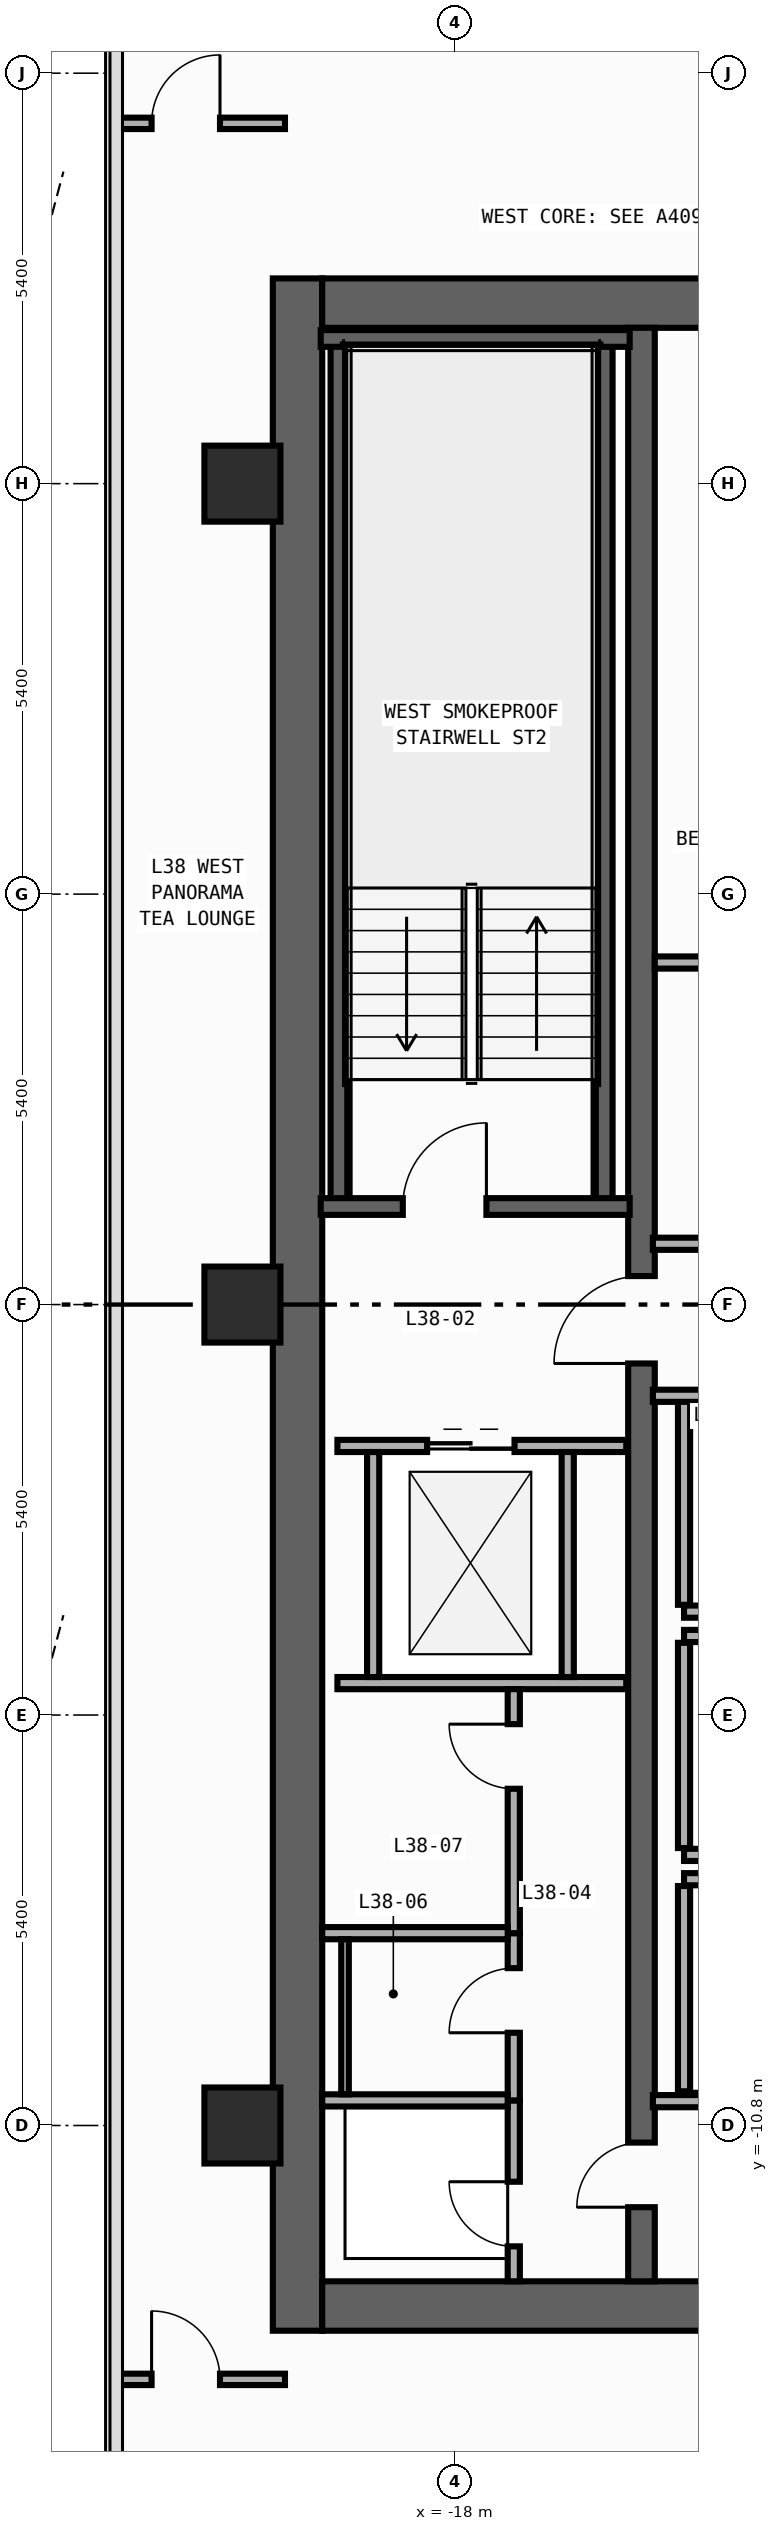
"""IFC4 building model, lengths in metres.
Left out: names, types, materials, properties, quantities, classifications, styles, units other than length and angle.
Written with IfcOpenShell. Run it as: python <this file> out.ifc"""

import sys

from ifc_helpers import new_model, si_unit, direction, frame, frame_2d, origin, origin_2d, place, context, subcontext, project, spatial, rectangle, extrude, element, fill, save


model = new_model("IFC4")
c1 = context("Model", 3, precision=1e-05, world=origin(), true_north=direction((0.0, 1.0)))
c2 = subcontext(c1, "Body", "Model", "MODEL_VIEW")
j1 = project(units=[si_unit("LENGTHUNIT", "METRE"), si_unit("PLANEANGLEUNIT", "RADIAN")], contexts=[c1])
p1 = place(None, origin())
s1 = spatial("IfcSite", under=j1, at=p1, CompositionType="ELEMENT")
p2 = place(p1, origin())
s2 = spatial("IfcBuilding", under=s1, at=p2, CompositionType="ELEMENT")
p3 = place(p2, frame((0.0, 0.0, 168.8)))
s3 = spatial("IfcBuildingStorey", under=s2, at=p3, CompositionType="ELEMENT", Elevation=168.8)
p4 = place(p3, frame((-20.075, -13.5, 0.0), z_axis=(0.0, 0.0, 1.0), x_axis=(0.0, 1.0, 0.0)))
e1 = element("IfcWall", 1, at=p4, inside=s3, PredefinedType="SHEAR", context=c2, shape_type="SweptSolid", body=[
    extrude(rectangle(XDim=27.0, YDim=0.65, at=frame_2d((13.5, 0.0))), origin(), (0.0, 0.0, 1.0), 3.54),
])
for number, where, z_axis, x_axis in (
    (2, (-19.75, -13.175, 0.0), (0.0, 0.0, 1.0), (1.0, 0.0, 0.0)),
    (3, (-19.75, 13.175, 0.0), (0.0, 0.0, 1.0), (1.0, 0.0, 0.0)),
):
    element("IfcWall", number, at=place(p3, frame(where, z_axis=z_axis, x_axis=x_axis)), inside=s3, PredefinedType="SHEAR", context=c2, shape_type="SweptSolid", body=[
        extrude(rectangle(XDim=7.1, YDim=0.65, at=frame_2d((3.55, 0.0))), origin(), (0.0, 0.0, 1.0), 3.54),
    ])
p5 = place(p3, frame((-15.55, -12.85, 0.0), z_axis=(0.0, 0.0, 1.0), x_axis=(0.0, 1.0, 0.0)))
e4 = element("IfcWall", 4, at=p5, inside=s3, PredefinedType="SHEAR", context=c2, shape_type="SweptSolid", body=[
    extrude(rectangle(XDim=25.7, YDim=0.35, at=frame_2d((12.85, 0.0))), origin(), (0.0, 0.0, 1.0), 3.54),
])
p6 = place(p5, frame((12.075, 0.0, 0.0)))
e5 = element("IfcOpeningElement", 5, at=p6, cuts=e4, PredefinedType="OPENING", context=c2, shape_type="SweptSolid", body=[
    extrude(rectangle(XDim=1.15, YDim=2.2, at=frame_2d((0.575, 1.1))), frame((0.0, 0.185, 0.0), z_axis=(0.0, -1.0, 0.0), x_axis=(1.0, 0.0, 0.0)), (0.0, 0.0, 1.0), 0.37),
])
p7 = place(p5, frame((0.975, 0.0, 0.0)))
e6 = element("IfcOpeningElement", 6, at=p7, cuts=e4, PredefinedType="OPENING", context=c2, shape_type="SweptSolid", body=[
    extrude(rectangle(XDim=0.85, YDim=2.1, at=frame_2d((0.425, 1.05))), frame((0.0, 0.185, 0.0), z_axis=(0.0, -1.0, 0.0), x_axis=(1.0, 0.0, 0.0)), (0.0, 0.0, 1.0), 0.37),
])
for number, where, z_axis, x_axis in (
    (7, (-16.04, 1.29, 0.0), (0.0, 0.0, 1.0), (0.0, 1.0, 0.0)),
    (8, (-19.53, 1.29, 0.0), (0.0, 0.0, 1.0), (0.0, 1.0, 0.0)),
):
    element("IfcWall", number, at=place(p3, frame(where, z_axis=z_axis, x_axis=x_axis)), inside=s3, PredefinedType="SHEAR", context=c2, shape_type="SweptSolid", body=[
        extrude(rectangle(XDim=11.42, YDim=0.22, at=frame_2d((5.71, 0.0))), origin(), (0.0, 0.0, 1.0), 3.54),
    ])
p8 = place(p3, frame((-19.77, 12.71, 0.0), z_axis=(0.0, 0.0, 1.0), x_axis=(1.0, 0.0, 0.0)))
e9 = element("IfcWall", 9, at=p8, inside=s3, PredefinedType="SHEAR", context=c2, shape_type="SweptSolid", body=[
    extrude(rectangle(XDim=4.065, YDim=0.22, at=frame_2d((2.032, 0.0))), origin(), (0.0, 0.0, 1.0), 3.54),
])
p9 = place(p3, frame((-19.77, 1.29, 0.0), z_axis=(0.0, 0.0, 1.0), x_axis=(1.0, 0.0, 0.0)))
e10 = element("IfcWall", 10, at=p9, inside=s3, PredefinedType="SHEAR", context=c2, shape_type="SweptSolid", body=[
    extrude(rectangle(XDim=4.065, YDim=0.22, at=frame_2d((2.032, 0.0))), origin(), (0.0, 0.0, 1.0), 3.54),
])
p10 = place(p9, frame((1.08, 0.0, 0.0)))
e11 = element("IfcOpeningElement", 11, at=p10, cuts=e10, PredefinedType="OPENING", context=c2, shape_type="SweptSolid", body=[
    extrude(rectangle(XDim=1.1, YDim=2.2, at=frame_2d((0.55, 1.1))), frame((0.0, 0.12, 0.0), z_axis=(0.0, -1.0, 0.0), x_axis=(1.0, 0.0, 0.0)), (0.0, 0.0, 1.0), 0.24),
])
for number, where, z_axis, x_axis in (
    (12, (-20.8, -10.8, 0.0), (0.0, 0.0, 1.0), (1.0, 0.0, 0.0)),
    (13, (-20.8, 0.0, 0.0), (0.0, 0.0, 1.0), (1.0, 0.0, 0.0)),
    (14, (-20.8, 10.8, 0.0), (0.0, 0.0, 1.0), (1.0, 0.0, 0.0)),
):
    element("IfcColumn", number, at=place(p3, frame(where, z_axis=z_axis, x_axis=x_axis)), inside=s3, PredefinedType="COLUMN", context=c2, shape_type="SweptSolid", body=[
        extrude(rectangle(XDim=1.0, YDim=1.0, at=origin_2d()), origin(), (0.0, 0.0, 1.0), 3.8),
    ])
p11 = place(p3, frame((-14.99, -4.04, 0.0), z_axis=(0.0, 0.0, 1.0), x_axis=(1.0, 0.0, 0.0)))
e15 = element("IfcWall", 15, at=p11, inside=s3, PredefinedType="STANDARD", context=c2, shape_type="SweptSolid", body=[
    extrude(rectangle(XDim=2.34, YDim=0.16, at=frame_2d((1.17, 0.0))), origin(), (0.0, 0.0, 1.0), 3.54),
])
p12 = place(p3, frame((-14.99, -3.95, 0.0), z_axis=(0.0, 0.0, 1.0), x_axis=(0.0, 1.0, 0.0)))
e16 = element("IfcWall", 16, at=p12, inside=s3, PredefinedType="STANDARD", context=c2, shape_type="SweptSolid", body=[
    extrude(rectangle(XDim=2.7, YDim=0.16, at=frame_2d((1.35, 0.0))), origin(), (0.0, 0.0, 1.0), 3.54),
])
for number, where, z_axis, x_axis in (
    (17, (-14.99, -7.24, 0.0), (0.0, 0.0, 1.0), (1.0, 0.0, 0.0)),
    (18, (-14.99, -4.36, 0.0), (0.0, 0.0, 1.0), (1.0, 0.0, 0.0)),
):
    element("IfcWall", number, at=place(p3, frame(where, z_axis=z_axis, x_axis=x_axis)), inside=s3, PredefinedType="STANDARD", context=c2, shape_type="SweptSolid", body=[
        extrude(rectangle(XDim=2.34, YDim=0.16, at=frame_2d((1.17, 0.0))), origin(), (0.0, 0.0, 1.0), 3.54),
    ])
p13 = place(p3, frame((-14.99, -7.15, 0.0), z_axis=(0.0, 0.0, 1.0), x_axis=(0.0, 1.0, 0.0)))
e19 = element("IfcWall", 19, at=p13, inside=s3, PredefinedType="STANDARD", context=c2, shape_type="SweptSolid", body=[
    extrude(rectangle(XDim=2.7, YDim=0.16, at=frame_2d((1.35, 0.0))), origin(), (0.0, 0.0, 1.0), 3.54),
])
p14 = place(p3, frame((-14.99, -7.56, 0.0), z_axis=(0.0, 0.0, 1.0), x_axis=(1.0, 0.0, 0.0)))
e20 = element("IfcWall", 20, at=p14, inside=s3, PredefinedType="STANDARD", context=c2, shape_type="SweptSolid", body=[
    extrude(rectangle(XDim=2.34, YDim=0.16, at=frame_2d((1.17, 0.0))), origin(), (0.0, 0.0, 1.0), 3.54),
])
p15 = place(p3, frame((-14.99, -10.35, 0.0), z_axis=(0.0, 0.0, 1.0), x_axis=(0.0, 1.0, 0.0)))
e21 = element("IfcWall", 21, at=p15, inside=s3, PredefinedType="STANDARD", context=c2, shape_type="SweptSolid", body=[
    extrude(rectangle(XDim=2.7, YDim=0.16, at=frame_2d((1.35, 0.0))), origin(), (0.0, 0.0, 1.0), 3.54),
])
p16 = place(p3, frame((-19.55, -1.86, 0.0), z_axis=(0.0, 0.0, 1.0), x_axis=(1.0, 0.0, 0.0)))
e22 = element("IfcWall", 22, at=p16, inside=s3, PredefinedType="STANDARD", context=c2, shape_type="SweptSolid", body=[
    extrude(rectangle(XDim=3.8, YDim=0.16, at=frame_2d((1.9, 0.0))), origin(), (0.0, 0.0, 1.0), 3.54),
])
p17 = place(p16, frame((1.18, 0.0, 0.0)))
e23 = element("IfcOpeningElement", 23, at=p17, cuts=e22, PredefinedType="OPENING", context=c2, shape_type="SweptSolid", body=[
    extrude(rectangle(XDim=1.15, YDim=2.2, at=frame_2d((0.575, 1.1))), frame((0.0, 0.09, 0.0), z_axis=(0.0, -1.0, 0.0), x_axis=(1.0, 0.0, 0.0)), (0.0, 0.0, 1.0), 0.18),
])
p18 = place(p3, frame((-19.55, -4.98, 0.0), z_axis=(0.0, 0.0, 1.0), x_axis=(1.0, 0.0, 0.0)))
e24 = element("IfcWall", 24, at=p18, inside=s3, PredefinedType="STANDARD", context=c2, shape_type="SweptSolid", body=[
    extrude(rectangle(XDim=3.8, YDim=0.16, at=frame_2d((1.9, 0.0))), origin(), (0.0, 0.0, 1.0), 3.54),
])
for number, where, z_axis, x_axis in (
    (25, (-19.08, -4.9, 0.0), (0.0, 0.0, 1.0), (0.0, 1.0, 0.0)),
    (26, (-16.52, -4.9, 0.0), (0.0, 0.0, 1.0), (0.0, 1.0, 0.0)),
):
    element("IfcWall", number, at=place(p3, frame(where, z_axis=z_axis, x_axis=x_axis)), inside=s3, PredefinedType="STANDARD", context=c2, shape_type="SweptSolid", body=[
        extrude(rectangle(XDim=2.96, YDim=0.16, at=frame_2d((1.48, 0.0))), origin(), (0.0, 0.0, 1.0), 3.54),
    ])
for number, where, z_axis, x_axis in (
    (27, (-15.4, 0.8, 0.0), (0.0, 0.0, 1.0), (1.0, 0.0, 0.0)),
    (28, (-15.4, -1.2, 0.0), (0.0, 0.0, 1.0), (1.0, 0.0, 0.0)),
    (29, (-15.4, -10.48, 0.0), (0.0, 0.0, 1.0), (1.0, 0.0, 0.0)),
):
    element("IfcWall", number, at=place(p3, frame(where, z_axis=z_axis, x_axis=x_axis)), inside=s3, PredefinedType="STANDARD", context=c2, shape_type="SweptSolid", body=[
        extrude(rectangle(XDim=2.6, YDim=0.16, at=frame_2d((1.3, 0.0))), origin(), (0.0, 0.0, 1.0), 3.54),
    ])
p19 = place(p3, frame((-17.23, -12.85, 0.0), z_axis=(0.0, 0.0, 1.0), x_axis=(0.0, 1.0, 0.0)))
e30 = element("IfcWall", 30, at=p19, inside=s3, PredefinedType="PARTITIONING", context=c2, shape_type="SweptSolid", body=[
    extrude(rectangle(XDim=2.38, YDim=0.16, at=frame_2d((1.19, 0.0))), origin(), (0.0, 0.0, 1.0), 3.54),
])
p20 = place(p19, frame((0.46, 0.0, 0.0)))
e31 = element("IfcOpeningElement", 31, at=p20, cuts=e30, PredefinedType="OPENING", context=c2, shape_type="SweptSolid", body=[
    extrude(rectangle(XDim=0.85, YDim=2.1, at=frame_2d((0.425, 1.05))), frame((0.0, 0.09, 0.0), z_axis=(0.0, -1.0, 0.0), x_axis=(1.0, 0.0, 0.0)), (0.0, 0.0, 1.0), 0.18),
])
p21 = place(p3, frame((-17.23, -10.47, 0.0), z_axis=(0.0, 0.0, 1.0), x_axis=(0.0, 1.0, 0.0)))
e32 = element("IfcWall", 32, at=p21, inside=s3, PredefinedType="PARTITIONING", context=c2, shape_type="SweptSolid", body=[
    extrude(rectangle(XDim=2.2, YDim=0.16, at=frame_2d((1.1, 0.0))), origin(), (0.0, 0.0, 1.0), 3.54),
])
p22 = place(p21, frame((0.89, 0.0, 0.0)))
e33 = element("IfcOpeningElement", 33, at=p22, cuts=e32, PredefinedType="OPENING", context=c2, shape_type="SweptSolid", body=[
    extrude(rectangle(XDim=0.85, YDim=2.1, at=frame_2d((0.425, 1.05))), frame((0.0, 0.09, 0.0), z_axis=(0.0, -1.0, 0.0), x_axis=(1.0, 0.0, 0.0)), (0.0, 0.0, 1.0), 0.18),
])
p23 = place(p3, frame((-17.23, -8.27, 0.0), z_axis=(0.0, 0.0, 1.0), x_axis=(0.0, 1.0, 0.0)))
e34 = element("IfcWall", 34, at=p23, inside=s3, PredefinedType="PARTITIONING", context=c2, shape_type="SweptSolid", body=[
    extrude(rectangle(XDim=3.21, YDim=0.16, at=frame_2d((1.605, 0.0))), origin(), (0.0, 0.0, 1.0), 3.54),
])
p24 = place(p23, frame((1.9, 0.0, 0.0)))
e35 = element("IfcOpeningElement", 35, at=p24, cuts=e34, PredefinedType="OPENING", context=c2, shape_type="SweptSolid", body=[
    extrude(rectangle(XDim=0.85, YDim=2.1, at=frame_2d((0.425, 1.05))), frame((0.0, 0.09, 0.0), z_axis=(0.0, -1.0, 0.0), x_axis=(1.0, 0.0, 0.0)), (0.0, 0.0, 1.0), 0.18),
])
for number, where, z_axis, x_axis in (
    (36, (-19.75, -10.47, 0.0), (0.0, 0.0, 1.0), (1.0, 0.0, 0.0)),
    (37, (-19.75, -8.27, 0.0), (0.0, 0.0, 1.0), (1.0, 0.0, 0.0)),
):
    element("IfcWall", number, at=place(p3, frame(where, z_axis=z_axis, x_axis=x_axis)), inside=s3, PredefinedType="PARTITIONING", context=c2, shape_type="SweptSolid", body=[
        extrude(rectangle(XDim=2.44, YDim=0.16, at=frame_2d((1.22, 0.0))), origin(), (0.0, 0.0, 1.0), 3.54),
    ])
p25 = place(p3, frame((-15.375, 4.5, 0.0), z_axis=(0.0, 0.0, 1.0), x_axis=(1.0, 0.0, 0.0)))
e38 = element("IfcWall", 38, at=p25, inside=s3, PredefinedType="PARTITIONING", context=c2, shape_type="SweptSolid", body=[
    extrude(rectangle(XDim=3.065, YDim=0.16, at=frame_2d((1.532, 0.0))), origin(), (0.0, 0.0, 1.0), 3.54),
])
p26 = place(p3, frame((-22.455, 15.54, 0.0), z_axis=(0.0, 0.0, 1.0), x_axis=(1.0, 0.0, 0.0)))
e39 = element("IfcWall", 39, at=p26, inside=s3, PredefinedType="PARTITIONING", context=c2, shape_type="SweptSolid", body=[
    extrude(rectangle(XDim=2.215, YDim=0.15, at=frame_2d((1.107, 0.0))), origin(), (0.0, 0.0, 1.0), 3.54),
])
p27 = place(p26, frame((0.46, 0.0, 0.0)))
e40 = element("IfcOpeningElement", 40, at=p27, cuts=e39, PredefinedType="OPENING", context=c2, shape_type="SweptSolid", body=[
    extrude(rectangle(XDim=0.9, YDim=2.15, at=frame_2d((0.45, 1.075))), frame((0.0, 0.085, 0.0), z_axis=(0.0, -1.0, 0.0), x_axis=(1.0, 0.0, 0.0)), (0.0, 0.0, 1.0), 0.17),
])
p28 = place(p3, frame((-22.455, -14.14, 0.0), z_axis=(0.0, 0.0, 1.0), x_axis=(1.0, 0.0, 0.0)))
e41 = element("IfcWall", 41, at=p28, inside=s3, PredefinedType="PARTITIONING", context=c2, shape_type="SweptSolid", body=[
    extrude(rectangle(XDim=2.215, YDim=0.15, at=frame_2d((1.107, 0.0))), origin(), (0.0, 0.0, 1.0), 3.54),
])
p29 = place(p28, frame((0.46, 0.0, 0.0)))
e42 = element("IfcOpeningElement", 42, at=p29, cuts=e41, PredefinedType="OPENING", context=c2, shape_type="SweptSolid", body=[
    extrude(rectangle(XDim=0.9, YDim=2.15, at=frame_2d((0.45, 1.075))), frame((0.0, 0.085, 0.0), z_axis=(0.0, -1.0, 0.0), x_axis=(1.0, 0.0, 0.0)), (0.0, 0.0, 1.0), 0.17),
])
p30 = place(p3, frame((-19.45, -10.39, 0.0), z_axis=(0.0, 0.0, 1.0), x_axis=(0.0, 1.0, 0.0)))
e43 = element("IfcWall", 43, at=p30, inside=s3, PredefinedType="PARTITIONING", context=c2, shape_type="SweptSolid", body=[
    extrude(rectangle(XDim=2.04, YDim=0.1, at=frame_2d((1.02, 0.0))), origin(), (0.0, 0.0, 1.0), 3.54),
])
p31 = place(p10, origin())
e44 = element("IfcDoor", 44, at=p31, inside=s3, OperationType="SINGLE_SWING_RIGHT", PredefinedType="DOOR", context=c2, shape_type="SweptSolid", body=[
    extrude(rectangle(XDim=1.1, YDim=2.2, at=frame_2d((0.55, 1.1))), frame((0.0, 0.025, 0.0), z_axis=(0.0, -1.0, 0.0), x_axis=(1.0, 0.0, 0.0)), (0.0, 0.0, 1.0), 0.05),
])
fill(e11, e44)
p32 = place(p6, origin())
e45 = element("IfcDoor", 45, at=p32, inside=s3, OperationType="SINGLE_SWING_LEFT", PredefinedType="DOOR", context=c2, shape_type="SweptSolid", body=[
    extrude(rectangle(XDim=1.15, YDim=2.2, at=frame_2d((0.575, 1.1))), frame((0.0, 0.025, 0.0), z_axis=(0.0, -1.0, 0.0), x_axis=(1.0, 0.0, 0.0)), (0.0, 0.0, 1.0), 0.05),
])
fill(e5, e45)
p33 = place(p7, origin())
e46 = element("IfcDoor", 46, at=p33, inside=s3, OperationType="SINGLE_SWING_LEFT", PredefinedType="DOOR", context=c2, shape_type="SweptSolid", body=[
    extrude(rectangle(XDim=0.85, YDim=2.1, at=frame_2d((0.425, 1.05))), frame((0.0, 0.025, 0.0), z_axis=(0.0, -1.0, 0.0), x_axis=(1.0, 0.0, 0.0)), (0.0, 0.0, 1.0), 0.05),
])
fill(e6, e46)
p34 = place(p17, origin())
e47 = element("IfcDoor", 47, at=p34, inside=s3, OperationType="DOUBLE_DOOR_SLIDING", PredefinedType="DOOR", context=c2, shape_type="SweptSolid", body=[
    extrude(rectangle(XDim=1.15, YDim=2.2, at=frame_2d((0.575, 1.1))), frame((0.0, 0.025, 0.0), z_axis=(0.0, -1.0, 0.0), x_axis=(1.0, 0.0, 0.0)), (0.0, 0.0, 1.0), 0.05),
])
fill(e23, e47)
p35 = place(p20, origin())
e48 = element("IfcDoor", 48, at=p35, inside=s3, OperationType="SINGLE_SWING_RIGHT", PredefinedType="DOOR", context=c2, shape_type="SweptSolid", body=[
    extrude(rectangle(XDim=0.85, YDim=2.1, at=frame_2d((0.425, 1.05))), frame((0.0, 0.025, 0.0), z_axis=(0.0, -1.0, 0.0), x_axis=(1.0, 0.0, 0.0)), (0.0, 0.0, 1.0), 0.05),
])
fill(e31, e48)
p36 = place(p22, origin())
e49 = element("IfcDoor", 49, at=p36, inside=s3, OperationType="SINGLE_SWING_LEFT", PredefinedType="DOOR", context=c2, shape_type="SweptSolid", body=[
    extrude(rectangle(XDim=0.85, YDim=2.1, at=frame_2d((0.425, 1.05))), frame((0.0, 0.025, 0.0), z_axis=(0.0, -1.0, 0.0), x_axis=(1.0, 0.0, 0.0)), (0.0, 0.0, 1.0), 0.05),
])
fill(e33, e49)
p37 = place(p24, origin())
e50 = element("IfcDoor", 50, at=p37, inside=s3, OperationType="SINGLE_SWING_RIGHT", PredefinedType="DOOR", context=c2, shape_type="SweptSolid", body=[
    extrude(rectangle(XDim=0.85, YDim=2.1, at=frame_2d((0.425, 1.05))), frame((0.0, 0.025, 0.0), z_axis=(0.0, -1.0, 0.0), x_axis=(1.0, 0.0, 0.0)), (0.0, 0.0, 1.0), 0.05),
])
fill(e35, e50)
p38 = place(p27, origin())
e51 = element("IfcDoor", 51, at=p38, inside=s3, OperationType="SINGLE_SWING_RIGHT", PredefinedType="DOOR", context=c2, shape_type="SweptSolid", body=[
    extrude(rectangle(XDim=0.9, YDim=2.15, at=frame_2d((0.45, 1.075))), frame((0.0, 0.025, 0.0), z_axis=(0.0, -1.0, 0.0), x_axis=(1.0, 0.0, 0.0)), (0.0, 0.0, 1.0), 0.05),
])
fill(e40, e51)
p39 = place(p29, origin())
e52 = element("IfcDoor", 52, at=p39, inside=s3, OperationType="SINGLE_SWING_LEFT", PredefinedType="DOOR", context=c2, shape_type="SweptSolid", body=[
    extrude(rectangle(XDim=0.9, YDim=2.15, at=frame_2d((0.45, 1.075))), frame((0.0, 0.025, 0.0), z_axis=(0.0, -1.0, 0.0), x_axis=(1.0, 0.0, 0.0)), (0.0, 0.0, 1.0), 0.05),
])
fill(e42, e52)
save(model, sys.argv[1])
